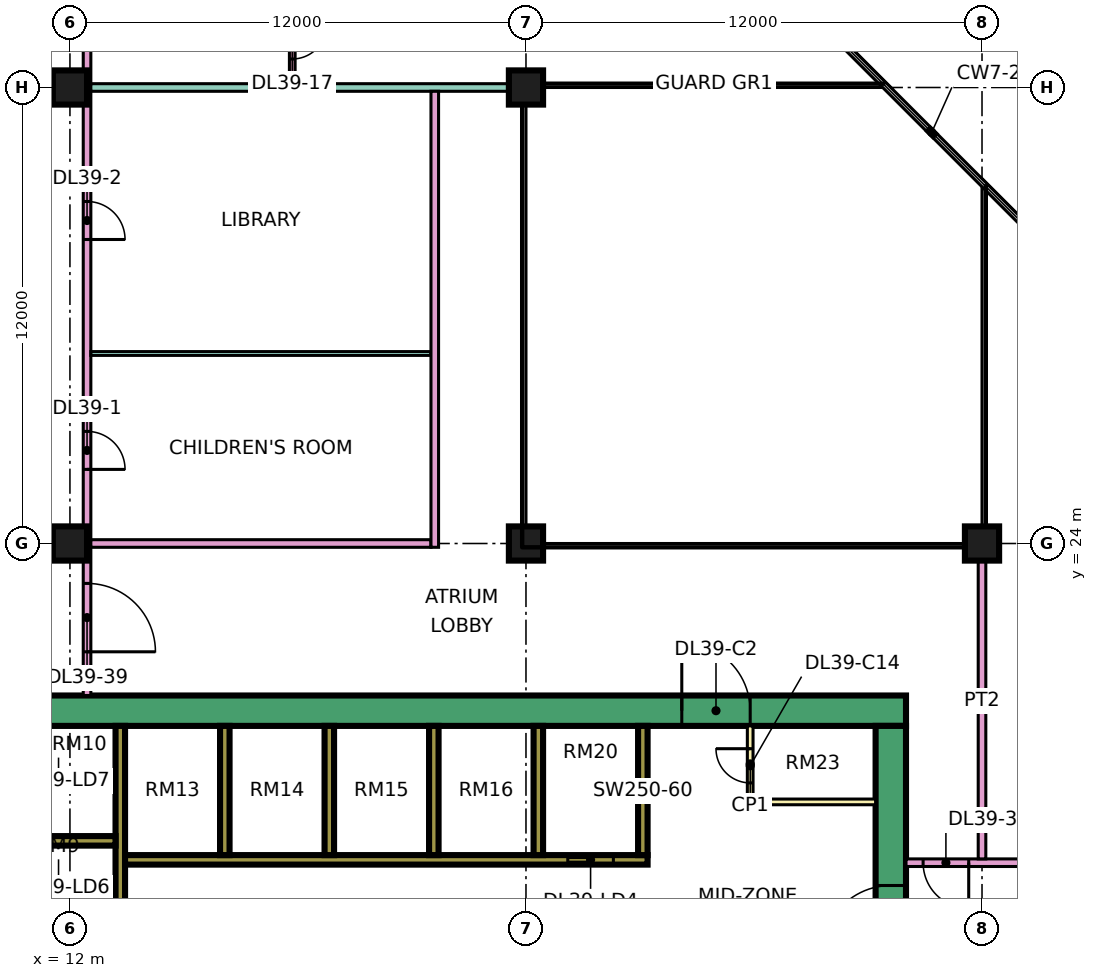
"""IFC4 building model, lengths in metres.
Left out: names, types, materials, properties, quantities, classifications, styles, units other than length and angle.
Written with IfcOpenShell. Run it as: python <this file> out.ifc"""

import sys

from ifc_helpers import new_model, si_unit, direction, frame, frame_2d, origin, origin_2d, place, context, subcontext, project, spatial, rectangle, extrude, element, fill, save


model = new_model("IFC4")
c1 = context("Model", 3, precision=1e-05, world=origin(), true_north=direction((0.0, 1.0)))
c2 = subcontext(c1, "Body", "Model", "MODEL_VIEW")
j1 = project(units=[si_unit("LENGTHUNIT", "METRE"), si_unit("PLANEANGLEUNIT", "RADIAN")], contexts=[c1])
p1 = place(None, origin())
s1 = spatial("IfcSite", under=j1, at=p1, CompositionType="ELEMENT")
p2 = place(p1, origin())
s2 = spatial("IfcBuilding", under=s1, at=p2, CompositionType="ELEMENT")
p3 = place(p2, frame((0.0, 0.0, 172.4)))
s3 = spatial("IfcBuildingStorey", under=s2, at=p3, CompositionType="ELEMENT", Elevation=172.4)
for number, where, z_axis, x_axis in (
    (1, (12.0, 24.0, 0.0), (0.0, 0.0, 1.0), (1.0, 0.0, 0.0)),
    (2, (12.0, 36.0, 0.0), (0.0, 0.0, 1.0), (1.0, 0.0, 0.0)),
    (3, (24.0, 24.0, 0.0), (0.0, 0.0, 1.0), (1.0, 0.0, 0.0)),
    (4, (24.0, 36.0, 0.0), (0.0, 0.0, 1.0), (1.0, 0.0, 0.0)),
    (5, (36.0, 24.0, 0.0), (0.0, 0.0, 1.0), (1.0, 0.0, 0.0)),
):
    element("IfcColumn", number, at=place(p3, frame(where, z_axis=z_axis, x_axis=x_axis)), inside=s3, PredefinedType="COLUMN", context=c2, shape_type="SweptSolid", body=[
        extrude(rectangle(XDim=0.9, YDim=0.9, at=origin_2d()), origin(), (0.0, 0.0, 1.0), 3.75),
    ])
p4 = place(p3, frame((9.0, 19.6, 0.0), z_axis=(0.0, 0.0, 1.0), x_axis=(1.0, 0.0, 0.0)))
e6 = element("IfcWall", 6, at=p4, inside=s3, PredefinedType="SHEAR", context=c2, shape_type="SweptSolid", body=[
    extrude(rectangle(XDim=25.0, YDim=0.8, at=frame_2d((12.5, 0.0))), origin(), (0.0, 0.0, 1.0), 3.75),
])
p5 = place(p4, frame((19.1, 0.0, 0.0)))
e7 = element("IfcOpeningElement", 7, at=p5, cuts=e6, PredefinedType="OPENING", context=c2, shape_type="SweptSolid", body=[
    extrude(rectangle(XDim=1.8, YDim=2.4, at=frame_2d((0.9, 1.2))), frame((0.0, 0.41, 0.0), z_axis=(0.0, -1.0, 0.0), x_axis=(1.0, 0.0, 0.0)), (0.0, 0.0, 1.0), 0.82),
])
p6 = place(p3, frame((33.6, 7.8, 0.0), z_axis=(0.0, 0.0, 1.0), x_axis=(0.0, 1.0, 0.0)))
e8 = element("IfcWall", 8, at=p6, inside=s3, PredefinedType="SHEAR", context=c2, shape_type="SweptSolid", body=[
    extrude(rectangle(XDim=11.4, YDim=0.8, at=frame_2d((5.7, 0.0))), origin(), (0.0, 0.0, 1.0), 3.75),
])
p7 = place(p6, frame((5.4, 0.0, 0.0)))
e9 = element("IfcOpeningElement", 9, at=p7, cuts=e8, PredefinedType="OPENING", context=c2, shape_type="SweptSolid", body=[
    extrude(rectangle(XDim=1.8, YDim=2.4, at=frame_2d((0.9, 1.2))), frame((0.0, 0.41, 0.0), z_axis=(0.0, -1.0, 0.0), x_axis=(1.0, 0.0, 0.0)), (0.0, 0.0, 1.0), 0.82),
])
p8 = place(p3, frame((13.325, 7.8, 0.0), z_axis=(0.0, 0.0, 1.0), x_axis=(0.0, 1.0, 0.0)))
e10 = element("IfcWall", 10, at=p8, inside=s3, PredefinedType="SHEAR", context=c2, shape_type="SweptSolid", body=[
    extrude(rectangle(XDim=11.4, YDim=0.25, at=frame_2d((5.7, 0.0))), origin(), (0.0, 0.0, 1.0), 3.75),
])
p9 = place(p3, frame((13.45, 15.675, 0.0), z_axis=(0.0, 0.0, 1.0), x_axis=(1.0, 0.0, 0.0)))
e11 = element("IfcWall", 11, at=p9, inside=s3, PredefinedType="SHEAR", context=c2, shape_type="SweptSolid", body=[
    extrude(rectangle(XDim=13.75, YDim=0.25, at=frame_2d((6.875, 0.0))), origin(), (0.0, 0.0, 1.0), 3.75),
])
p10 = place(p9, frame((11.65, 0.0, 0.0)))
e12 = element("IfcOpeningElement", 12, at=p10, cuts=e11, PredefinedType="OPENING", context=c2, shape_type="SweptSolid", body=[
    extrude(rectangle(XDim=1.2, YDim=2.2, at=frame_2d((0.6, 1.1))), frame((0.0, 0.135, 0.0), z_axis=(0.0, -1.0, 0.0), x_axis=(1.0, 0.0, 0.0)), (0.0, 0.0, 1.0), 0.27),
])
p11 = place(p3, frame((10.2, 16.175, 0.0), z_axis=(0.0, 0.0, 1.0), x_axis=(1.0, 0.0, 0.0)))
e13 = element("IfcWall", 13, at=p11, inside=s3, PredefinedType="SHEAR", context=c2, shape_type="SweptSolid", body=[
    extrude(rectangle(XDim=3.0, YDim=0.25, at=frame_2d((1.5, 0.0))), origin(), (0.0, 0.0, 1.0), 3.75),
])
for number, where, z_axis, x_axis in (
    (14, (16.075, 15.8, 0.0), (0.0, 0.0, 1.0), (0.0, 1.0, 0.0)),
    (15, (18.825, 15.8, 0.0), (0.0, 0.0, 1.0), (0.0, 1.0, 0.0)),
    (16, (21.575, 15.8, 0.0), (0.0, 0.0, 1.0), (0.0, 1.0, 0.0)),
    (17, (24.325, 15.8, 0.0), (0.0, 0.0, 1.0), (0.0, 1.0, 0.0)),
    (18, (27.075, 15.8, 0.0), (0.0, 0.0, 1.0), (0.0, 1.0, 0.0)),
):
    element("IfcWall", number, at=place(p3, frame(where, z_axis=z_axis, x_axis=x_axis)), inside=s3, PredefinedType="SHEAR", context=c2, shape_type="SweptSolid", body=[
        extrude(rectangle(XDim=3.4, YDim=0.25, at=frame_2d((1.7, 0.0))), origin(), (0.0, 0.0, 1.0), 3.75),
    ])
p12 = place(p3, frame((29.9, 17.2, 0.0), z_axis=(0.0, 0.0, 1.0), x_axis=(0.0, 1.0, 0.0)))
e19 = element("IfcWall", 19, at=p12, inside=s3, PredefinedType="PARTITIONING", context=c2, shape_type="SweptSolid", body=[
    extrude(rectangle(XDim=2.0, YDim=0.15, at=frame_2d((1.0, 0.0))), origin(), (0.0, 0.0, 1.0), 3.35),
])
p13 = place(p12, frame((0.5, 0.0, 0.0)))
e20 = element("IfcOpeningElement", 20, at=p13, cuts=e19, PredefinedType="OPENING", context=c2, shape_type="SweptSolid", body=[
    extrude(rectangle(XDim=0.9, YDim=2.1, at=frame_2d((0.45, 1.05))), frame((0.0, 0.085, 0.0), z_axis=(0.0, -1.0, 0.0), x_axis=(1.0, 0.0, 0.0)), (0.0, 0.0, 1.0), 0.17),
])
p14 = place(p3, frame((29.9, 17.2, 0.0), z_axis=(0.0, 0.0, 1.0), x_axis=(1.0, 0.0, 0.0)))
e21 = element("IfcWall", 21, at=p14, inside=s3, PredefinedType="PARTITIONING", context=c2, shape_type="SweptSolid", body=[
    extrude(rectangle(XDim=3.3, YDim=0.15, at=frame_2d((1.65, 0.0))), origin(), (0.0, 0.0, 1.0), 3.35),
])
p15 = place(p3, frame((12.45, 20.0, 0.0), z_axis=(0.0, 0.0, 1.0), x_axis=(0.0, 1.0, 0.0)))
e22 = element("IfcWall", 22, at=p15, inside=s3, PredefinedType="PARTITIONING", context=c2, shape_type="SweptSolid", body=[
    extrude(rectangle(XDim=43.0, YDim=0.2, at=frame_2d((21.5, 0.0))), origin(), (0.0, 0.0, 1.0), 3.35),
])
p16 = place(p15, frame((5.95, 0.0, 0.0)))
e23 = element("IfcOpeningElement", 23, at=p16, cuts=e22, PredefinedType="OPENING", context=c2, shape_type="SweptSolid", body=[
    extrude(rectangle(XDim=1.0, YDim=2.1, at=frame_2d((0.5, 1.05))), frame((0.0, 0.11, 0.0), z_axis=(0.0, -1.0, 0.0), x_axis=(1.0, 0.0, 0.0)), (0.0, 0.0, 1.0), 0.22),
])
p17 = place(p15, frame((12.0, 0.0, 0.0)))
e24 = element("IfcOpeningElement", 24, at=p17, cuts=e22, PredefinedType="OPENING", context=c2, shape_type="SweptSolid", body=[
    extrude(rectangle(XDim=1.0, YDim=2.1, at=frame_2d((0.5, 1.05))), frame((0.0, 0.11, 0.0), z_axis=(0.0, -1.0, 0.0), x_axis=(1.0, 0.0, 0.0)), (0.0, 0.0, 1.0), 0.22),
])
p18 = place(p15, frame((22.75, 0.0, 0.0)))
e25 = element("IfcOpeningElement", 25, at=p18, cuts=e22, PredefinedType="OPENING", context=c2, shape_type="SweptSolid", body=[
    extrude(rectangle(XDim=1.0, YDim=2.1, at=frame_2d((0.5, 1.05))), frame((0.0, 0.11, 0.0), z_axis=(0.0, -1.0, 0.0), x_axis=(1.0, 0.0, 0.0)), (0.0, 0.0, 1.0), 0.22),
])
p19 = place(p15, frame((34.75, 0.0, 0.0)))
e26 = element("IfcOpeningElement", 26, at=p19, cuts=e22, PredefinedType="OPENING", context=c2, shape_type="SweptSolid", body=[
    extrude(rectangle(XDim=1.0, YDim=2.1, at=frame_2d((0.5, 1.05))), frame((0.0, 0.11, 0.0), z_axis=(0.0, -1.0, 0.0), x_axis=(1.0, 0.0, 0.0)), (0.0, 0.0, 1.0), 0.22),
])
p20 = place(p15, frame((1.15, 0.0, 0.0)))
e27 = element("IfcOpeningElement", 27, at=p20, cuts=e22, PredefinedType="OPENING", context=c2, shape_type="SweptSolid", body=[
    extrude(rectangle(XDim=1.8, YDim=2.1, at=frame_2d((0.9, 1.05))), frame((0.0, 0.11, 0.0), z_axis=(0.0, -1.0, 0.0), x_axis=(1.0, 0.0, 0.0)), (0.0, 0.0, 1.0), 0.22),
])
p21 = place(p15, frame((28.6, 0.0, 0.0)))
e28 = element("IfcOpeningElement", 28, at=p21, cuts=e22, PredefinedType="OPENING", context=c2, shape_type="SweptSolid", body=[
    extrude(rectangle(XDim=1.8, YDim=2.1, at=frame_2d((0.9, 1.05))), frame((0.0, 0.11, 0.0), z_axis=(0.0, -1.0, 0.0), x_axis=(1.0, 0.0, 0.0)), (0.0, 0.0, 1.0), 0.22),
])
p22 = place(p3, frame((12.55, 24.0, 0.0), z_axis=(0.0, 0.0, 1.0), x_axis=(1.0, 0.0, 0.0)))
e29 = element("IfcWall", 29, at=p22, inside=s3, PredefinedType="PARTITIONING", context=c2, shape_type="SweptSolid", body=[
    extrude(rectangle(XDim=8.95, YDim=0.2, at=frame_2d((4.475, 0.0))), origin(), (0.0, 0.0, 1.0), 3.35),
])
p23 = place(p3, frame((12.55, 29.0, 0.0), z_axis=(0.0, 0.0, 1.0), x_axis=(1.0, 0.0, 0.0)))
e30 = element("IfcWall", 30, at=p23, inside=s3, PredefinedType="PARTITIONING", context=c2, shape_type="SweptSolid", body=[
    extrude(rectangle(XDim=8.95, YDim=0.1, at=frame_2d((4.475, 0.0))), origin(), (0.0, 0.0, 1.0), 3.35),
])
p24 = place(p3, frame((12.55, 36.0, 0.0), z_axis=(0.0, 0.0, 1.0), x_axis=(1.0, 0.0, 0.0)))
e31 = element("IfcWall", 31, at=p24, inside=s3, PredefinedType="PARTITIONING", context=c2, shape_type="SweptSolid", body=[
    extrude(rectangle(XDim=11.45, YDim=0.2, at=frame_2d((5.725, 0.0))), origin(), (0.0, 0.0, 1.0), 3.35),
])
p25 = place(p3, frame((17.85, 36.1, 0.0), z_axis=(0.0, 0.0, 1.0), x_axis=(0.0, 1.0, 0.0)))
e32 = element("IfcWall", 32, at=p25, inside=s3, PredefinedType="PARTITIONING", context=c2, shape_type="SweptSolid", body=[
    extrude(rectangle(XDim=5.225, YDim=0.15, at=frame_2d((2.612, 0.0))), origin(), (0.0, 0.0, 1.0), 3.35),
])
p26 = place(p25, frame((3.45, 0.0, 0.0)))
e33 = element("IfcOpeningElement", 33, at=p26, cuts=e32, PredefinedType="OPENING", context=c2, shape_type="SweptSolid", body=[
    extrude(rectangle(XDim=0.8, YDim=2.1, at=frame_2d((0.4, 1.05))), frame((0.0, 0.085, 0.0), z_axis=(0.0, -1.0, 0.0), x_axis=(1.0, 0.0, 0.0)), (0.0, 0.0, 1.0), 0.17),
])
p27 = place(p25, frame((0.65, 0.0, 0.0)))
e34 = element("IfcOpeningElement", 34, at=p27, cuts=e32, PredefinedType="OPENING", context=c2, shape_type="SweptSolid", body=[
    extrude(rectangle(XDim=0.9, YDim=2.1, at=frame_2d((0.45, 1.05))), frame((0.0, 0.085, 0.0), z_axis=(0.0, -1.0, 0.0), x_axis=(1.0, 0.0, 0.0)), (0.0, 0.0, 1.0), 0.17),
])
p28 = place(p3, frame((21.6, 23.9, 0.0), z_axis=(0.0, 0.0, 1.0), x_axis=(0.0, 1.0, 0.0)))
e35 = element("IfcWall", 35, at=p28, inside=s3, PredefinedType="PARTITIONING", context=c2, shape_type="SweptSolid", body=[
    extrude(rectangle(XDim=12.0, YDim=0.2, at=frame_2d((6.0, 0.0))), origin(), (0.0, 0.0, 1.0), 3.35),
])
p29 = place(p3, frame((34.0, 15.6, 0.0), z_axis=(0.0, 0.0, 1.0), x_axis=(1.0, 0.0, 0.0)))
e36 = element("IfcWall", 36, at=p29, inside=s3, PredefinedType="PARTITIONING", context=c2, shape_type="SweptSolid", body=[
    extrude(rectangle(XDim=10.35, YDim=0.2, at=frame_2d((5.175, 0.0))), origin(), (0.0, 0.0, 1.0), 3.35),
])
p30 = place(p29, frame((5.6, 0.0, 0.0)))
e37 = element("IfcOpeningElement", 37, at=p30, cuts=e36, PredefinedType="OPENING", context=c2, shape_type="SweptSolid", body=[
    extrude(rectangle(XDim=1.0, YDim=2.1, at=frame_2d((0.5, 1.05))), frame((0.0, 0.11, 0.0), z_axis=(0.0, -1.0, 0.0), x_axis=(1.0, 0.0, 0.0)), (0.0, 0.0, 1.0), 0.22),
])
p31 = place(p29, frame((0.45, 0.0, 0.0)))
e38 = element("IfcOpeningElement", 38, at=p31, cuts=e36, PredefinedType="OPENING", context=c2, shape_type="SweptSolid", body=[
    extrude(rectangle(XDim=1.2, YDim=2.1, at=frame_2d((0.6, 1.05))), frame((0.0, 0.11, 0.0), z_axis=(0.0, -1.0, 0.0), x_axis=(1.0, 0.0, 0.0)), (0.0, 0.0, 1.0), 0.22),
])
p32 = place(p3, frame((36.0, 15.7, 0.0), z_axis=(0.0, 0.0, 1.0), x_axis=(0.0, 1.0, 0.0)))
e39 = element("IfcWall", 39, at=p32, inside=s3, PredefinedType="PARTITIONING", context=c2, shape_type="SweptSolid", body=[
    extrude(rectangle(XDim=8.3, YDim=0.2, at=frame_2d((4.15, 0.0))), origin(), (0.0, 0.0, 1.0), 3.35),
])
p33 = place(p10, origin())
e40 = element("IfcDoor", 40, at=p33, inside=s3, OperationType="DOUBLE_DOOR_SLIDING", PredefinedType="DOOR", context=c2, shape_type="SweptSolid", body=[
    extrude(rectangle(XDim=1.2, YDim=2.2, at=frame_2d((0.6, 1.1))), frame((0.0, 0.025, 0.0), z_axis=(0.0, -1.0, 0.0), x_axis=(1.0, 0.0, 0.0)), (0.0, 0.0, 1.0), 0.05),
])
fill(e12, e40)
p34 = place(p7, origin())
e41 = element("IfcDoor", 41, at=p34, inside=s3, OperationType="DOUBLE_DOOR_SINGLE_SWING", PredefinedType="DOOR", context=c2, shape_type="SweptSolid", body=[
    extrude(rectangle(XDim=1.8, YDim=2.4, at=frame_2d((0.9, 1.2))), frame((0.0, 0.025, 0.0), z_axis=(0.0, -1.0, 0.0), x_axis=(1.0, 0.0, 0.0)), (0.0, 0.0, 1.0), 0.05),
])
fill(e9, e41)
p35 = place(p5, origin())
e42 = element("IfcDoor", 42, at=p35, inside=s3, OperationType="DOUBLE_DOOR_SINGLE_SWING", PredefinedType="DOOR", context=c2, shape_type="SweptSolid", body=[
    extrude(rectangle(XDim=1.8, YDim=2.4, at=frame_2d((0.9, 1.2))), frame((0.0, 0.025, 0.0), z_axis=(0.0, -1.0, 0.0), x_axis=(1.0, 0.0, 0.0)), (0.0, 0.0, 1.0), 0.05),
])
fill(e7, e42)
p36 = place(p13, frame((0.9, 0.0, 0.0), z_axis=(0.0, 0.0, 1.0), x_axis=(-1.0, 0.0, 0.0)))
e43 = element("IfcDoor", 43, at=p36, inside=s3, OperationType="SINGLE_SWING_RIGHT", PredefinedType="DOOR", context=c2, shape_type="SweptSolid", body=[
    extrude(rectangle(XDim=0.9, YDim=2.1, at=frame_2d((0.45, 1.05))), frame((0.0, 0.025, 0.0), z_axis=(0.0, -1.0, 0.0), x_axis=(1.0, 0.0, 0.0)), (0.0, 0.0, 1.0), 0.05),
])
fill(e20, e43)
p37 = place(p16, frame((1.0, 0.0, 0.0), z_axis=(0.0, 0.0, 1.0), x_axis=(-1.0, 0.0, 0.0)))
e44 = element("IfcDoor", 44, at=p37, inside=s3, OperationType="SINGLE_SWING_LEFT", PredefinedType="DOOR", context=c2, shape_type="SweptSolid", body=[
    extrude(rectangle(XDim=1.0, YDim=2.1, at=frame_2d((0.5, 1.05))), frame((0.0, 0.025, 0.0), z_axis=(0.0, -1.0, 0.0), x_axis=(1.0, 0.0, 0.0)), (0.0, 0.0, 1.0), 0.05),
])
fill(e23, e44)
p38 = place(p17, frame((1.0, 0.0, 0.0), z_axis=(0.0, 0.0, 1.0), x_axis=(-1.0, 0.0, 0.0)))
e45 = element("IfcDoor", 45, at=p38, inside=s3, OperationType="SINGLE_SWING_LEFT", PredefinedType="DOOR", context=c2, shape_type="SweptSolid", body=[
    extrude(rectangle(XDim=1.0, YDim=2.1, at=frame_2d((0.5, 1.05))), frame((0.0, 0.025, 0.0), z_axis=(0.0, -1.0, 0.0), x_axis=(1.0, 0.0, 0.0)), (0.0, 0.0, 1.0), 0.05),
])
fill(e24, e45)
p39 = place(p27, origin())
e46 = element("IfcDoor", 46, at=p39, inside=s3, OperationType="SINGLE_SWING_RIGHT", PredefinedType="DOOR", context=c2, shape_type="SweptSolid", body=[
    extrude(rectangle(XDim=0.9, YDim=2.1, at=frame_2d((0.45, 1.05))), frame((0.0, 0.025, 0.0), z_axis=(0.0, -1.0, 0.0), x_axis=(1.0, 0.0, 0.0)), (0.0, 0.0, 1.0), 0.05),
])
fill(e34, e46)
p40 = place(p31, origin())
e47 = element("IfcDoor", 47, at=p40, inside=s3, OperationType="SINGLE_SWING_RIGHT", PredefinedType="DOOR", context=c2, shape_type="SweptSolid", body=[
    extrude(rectangle(XDim=1.2, YDim=2.1, at=frame_2d((0.6, 1.05))), frame((0.0, 0.025, 0.0), z_axis=(0.0, -1.0, 0.0), x_axis=(1.0, 0.0, 0.0)), (0.0, 0.0, 1.0), 0.05),
])
fill(e38, e47)
p41 = place(p20, frame((1.8, 0.0, 0.0), z_axis=(0.0, 0.0, 1.0), x_axis=(-1.0, 0.0, 0.0)))
e48 = element("IfcDoor", 48, at=p41, inside=s3, OperationType="DOUBLE_DOOR_SINGLE_SWING", PredefinedType="DOOR", context=c2, shape_type="SweptSolid", body=[
    extrude(rectangle(XDim=1.8, YDim=2.1, at=frame_2d((0.9, 1.05))), frame((0.0, 0.025, 0.0), z_axis=(0.0, -1.0, 0.0), x_axis=(1.0, 0.0, 0.0)), (0.0, 0.0, 1.0), 0.05),
])
fill(e27, e48)
save(model, sys.argv[1])
